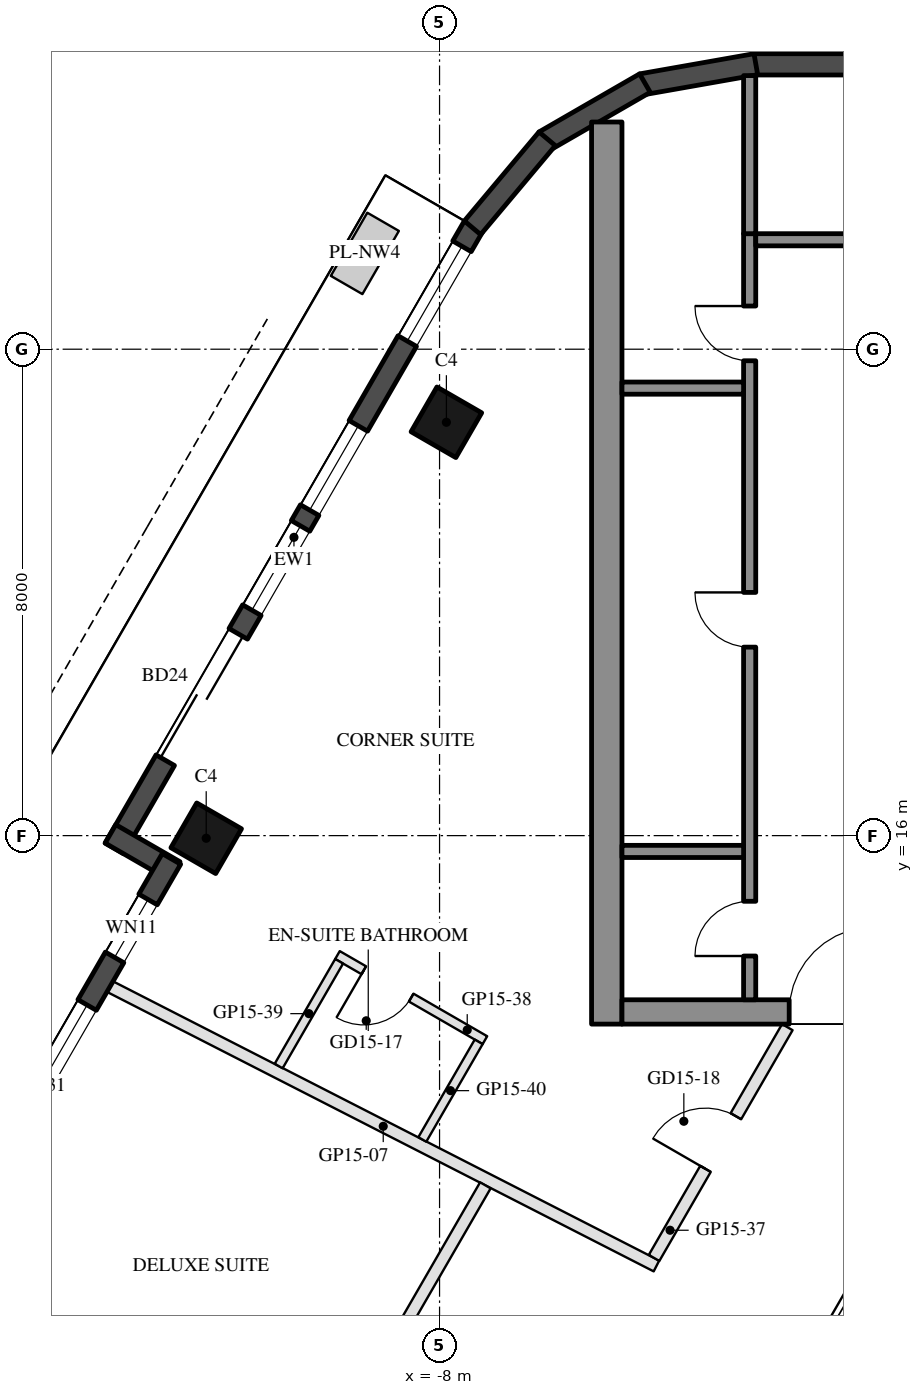
"""IFC4 building model, lengths in metres.
Left out: names, types, materials, properties, quantities, classifications, styles, units other than length and angle.
Written with IfcOpenShell. Run it as: python <this file> out.ifc"""

import sys

from ifc_helpers import new_model, si_unit, direction, frame, frame_2d, origin, origin_2d, place, context, subcontext, project, spatial, rectangle, hollow_rectangle, extrude, element, fill, save


model = new_model("IFC4")
c1 = context("Model", 3, precision=1e-05, world=origin(), true_north=direction((0.0, 1.0)))
c2 = subcontext(c1, "Body", "Model", "MODEL_VIEW")
j1 = project(units=[si_unit("LENGTHUNIT", "METRE"), si_unit("PLANEANGLEUNIT", "RADIAN")], contexts=[c1])
p1 = place(None, origin())
s1 = spatial("IfcSite", under=j1, at=p1, CompositionType="ELEMENT")
p2 = place(p1, origin())
s2 = spatial("IfcBuilding", under=s1, at=p2, CompositionType="ELEMENT")
p3 = place(p2, frame((0.0, 0.0, 168.8)))
s3 = spatial("IfcBuildingStorey", under=s2, at=p3, CompositionType="ELEMENT", Elevation=168.8)
for number, where, z_axis, x_axis in (
    (1, (-7.888, 22.798, 0.0), (0.0, 0.0, 1.0), (0.5, 0.866, 0.0)),
    (2, (-11.838, 15.957, 0.0), (0.0, 0.0, 1.0), (0.5, 0.866, 0.0)),
):
    element("IfcColumn", number, at=place(p3, frame(where, z_axis=z_axis, x_axis=x_axis)), inside=s3, PredefinedType="COLUMN", context=c2, shape_type="SweptSolid", body=[
        extrude(hollow_rectangle(XDim=0.85, YDim=0.85, WallThickness=0.04, at=origin_2d()), origin(), (0.0, 0.0, 1.0), 3.7),
    ])
p4 = place(p3, frame((-7.441, 26.022, 0.0), z_axis=(0.0, 0.0, 1.0), x_axis=(-0.499992533062, -0.86602971478, 0.0)))
e3 = element("IfcWall", 3, at=p4, inside=s3, PredefinedType="SOLIDWALL", context=c2, shape_type="SweptSolid", body=[
    extrude(rectangle(XDim=11.816, YDim=0.35, at=frame_2d((5.908, 0.0))), origin(), (0.0, 0.0, 1.0), 3.55),
])
p5 = place(p4, frame((0.381, 0.0, 0.3)))
e4 = element("IfcOpeningElement", 4, at=p5, cuts=e3, PredefinedType="OPENING", context=c2, shape_type="SweptSolid", body=[
    extrude(rectangle(XDim=1.8, YDim=2.65, at=frame_2d((0.9, 1.325))), frame((0.0, 0.185, 0.0), z_axis=(0.0, -1.0, 0.0), x_axis=(1.0, 0.0, 0.0)), (0.0, 0.0, 1.0), 0.37),
])
p6 = place(p4, frame((7.74, 0.0, 0.0)))
e5 = element("IfcOpeningElement", 5, at=p6, cuts=e3, PredefinedType="OPENING", context=c2, shape_type="SweptSolid", body=[
    extrude(rectangle(XDim=2.4, YDim=2.4, at=frame_2d((1.2, 1.2))), frame((0.0, 0.185, 0.0), z_axis=(0.0, -1.0, 0.0), x_axis=(1.0, 0.0, 0.0)), (0.0, 0.0, 1.0), 0.37),
])
p7 = place(p4, frame((3.791, 0.0, 0.3)))
e6 = element("IfcOpeningElement", 6, at=p7, cuts=e3, PredefinedType="OPENING", context=c2, shape_type="SweptSolid", body=[
    extrude(rectangle(XDim=1.6, YDim=2.65, at=frame_2d((0.8, 1.325))), frame((0.0, 0.185, 0.0), z_axis=(0.0, -1.0, 0.0), x_axis=(1.0, 0.0, 0.0)), (0.0, 0.0, 1.0), 0.37),
])
p8 = place(p4, frame((5.691, 0.0, 0.3)))
e7 = element("IfcOpeningElement", 7, at=p8, cuts=e3, PredefinedType="OPENING", context=c2, shape_type="SweptSolid", body=[
    extrude(rectangle(XDim=1.6, YDim=2.65, at=frame_2d((0.8, 1.325))), frame((0.0, 0.185, 0.0), z_axis=(0.0, -1.0, 0.0), x_axis=(1.0, 0.0, 0.0)), (0.0, 0.0, 1.0), 0.37),
])
p9 = place(p3, frame((-13.413, 16.029, 0.0), z_axis=(0.0, 0.0, 1.0), x_axis=(0.866005645448, -0.500034220881, 0.0)))
e8 = element("IfcWall", 8, at=p9, inside=s3, PredefinedType="SOLIDWALL", context=c2, shape_type="SweptSolid", body=[
    extrude(rectangle(XDim=1.22, YDim=0.35, at=frame_2d((0.61, 0.0))), origin(), (0.0, 0.0, 1.0), 3.55),
])
p10 = place(p3, frame((-12.409, 15.617, 0.0), z_axis=(0.0, 0.0, 1.0), x_axis=(-0.500003597184, -0.866023326939, 0.0)))
e9 = element("IfcWall", 9, at=p10, inside=s3, PredefinedType="SOLIDWALL", context=c2, shape_type="SweptSolid", body=[
    extrude(rectangle(XDim=6.74, YDim=0.35, at=frame_2d((3.37, 0.0))), origin(), (0.0, 0.0, 1.0), 3.55),
])
p11 = place(p10, frame((0.77, 0.0, 0.3)))
e10 = element("IfcOpeningElement", 10, at=p11, cuts=e9, PredefinedType="OPENING", context=c2, shape_type="SweptSolid", body=[
    extrude(rectangle(XDim=1.1, YDim=2.65, at=frame_2d((0.55, 1.325))), frame((0.0, 0.185, 0.0), z_axis=(0.0, -1.0, 0.0), x_axis=(1.0, 0.0, 0.0)), (0.0, 0.0, 1.0), 0.37),
])
p12 = place(p10, frame((2.774, 0.0, 0.3)))
e11 = element("IfcOpeningElement", 11, at=p12, cuts=e9, PredefinedType="OPENING", context=c2, shape_type="SweptSolid", body=[
    extrude(rectangle(XDim=3.1, YDim=2.65, at=frame_2d((1.55, 1.325))), frame((0.0, 0.185, 0.0), z_axis=(0.0, -1.0, 0.0), x_axis=(1.0, 0.0, 0.0)), (0.0, 0.0, 1.0), 0.37),
])
p13 = place(p3, frame((2.829, 28.685, 0.0), z_axis=(0.0, 0.0, 1.0), x_axis=(-1.0, 0.0, 0.0)))
e12 = element("IfcWall", 12, at=p13, inside=s3, PredefinedType="SOLIDWALL", context=c2, shape_type="SweptSolid", body=[
    extrude(rectangle(XDim=5.658, YDim=0.35, at=frame_2d((2.829, 0.0))), origin(), (0.0, 0.0, 1.0), 3.55),
])
for number, where, z_axis, x_axis in (
    (13, (-2.799, 28.688, 0.0), (0.0, 0.0, 1.0), (-0.985, -0.174, 0.0)),
    (14, (-4.623, 28.377, 0.0), (0.0, 0.0, 1.0), (-0.866, -0.5, 0.0)),
):
    element("IfcWall", number, at=place(p3, frame(where, z_axis=z_axis, x_axis=x_axis)), inside=s3, PredefinedType="SOLIDWALL", context=c2, shape_type="SweptSolid", body=[
        extrude(rectangle(XDim=1.91, YDim=0.35, at=frame_2d((0.955, 0.0))), origin(), (0.0, 0.0, 1.0), 3.55),
    ])
p14 = place(p3, frame((-6.23, 27.461, 0.0), z_axis=(0.0, 0.0, 1.0), x_axis=(-0.642808304945, -0.766027077259, 0.0)))
e15 = element("IfcWall", 15, at=p14, inside=s3, PredefinedType="SOLIDWALL", context=c2, shape_type="SweptSolid", body=[
    extrude(rectangle(XDim=1.91, YDim=0.35, at=frame_2d((0.955, 0.0))), origin(), (0.0, 0.0, 1.0), 3.55),
])
p15 = place(p3, frame((-5.25, 12.9, 0.0), z_axis=(0.0, 0.0, 1.0), x_axis=(0.0, 1.0, 0.0)))
e16 = element("IfcWall", 16, at=p15, inside=s3, PredefinedType="SHEAR", context=c2, shape_type="SweptSolid", body=[
    extrude(rectangle(XDim=14.837, YDim=0.5, at=frame_2d((7.418, 0.0))), origin(), (0.0, 0.0, 1.0), 3.5),
])
p16 = place(p3, frame((5.0, 13.1, 0.0), z_axis=(0.0, 0.0, 1.0), x_axis=(-1.0, 0.0, 0.0)))
e17 = element("IfcWall", 17, at=p16, inside=s3, PredefinedType="SHEAR", context=c2, shape_type="SweptSolid", body=[
    extrude(rectangle(XDim=10.0, YDim=0.4, at=frame_2d((5.0, 0.0))), origin(), (0.0, 0.0, 1.0), 3.5),
])
p17 = place(p16, frame((3.55, 0.0, 0.0)))
e18 = element("IfcOpeningElement", 18, at=p17, cuts=e17, PredefinedType="OPENING", context=c2, shape_type="SweptSolid", body=[
    extrude(rectangle(XDim=1.1, YDim=2.1, at=frame_2d((0.55, 1.05))), frame((0.0, 0.21, 0.0), z_axis=(0.0, -1.0, 0.0), x_axis=(1.0, 0.0, 0.0)), (0.0, 0.0, 1.0), 0.42),
])
p18 = place(p16, frame((5.85, 0.0, 0.0)))
e19 = element("IfcOpeningElement", 19, at=p18, cuts=e17, PredefinedType="OPENING", context=c2, shape_type="SweptSolid", body=[
    extrude(rectangle(XDim=1.4, YDim=2.1, at=frame_2d((0.7, 1.05))), frame((0.0, 0.21, 0.0), z_axis=(0.0, -1.0, 0.0), x_axis=(1.0, 0.0, 0.0)), (0.0, 0.0, 1.0), 0.42),
])
p19 = place(p3, frame((-2.9, 13.3, 0.0), z_axis=(0.0, 0.0, 1.0), x_axis=(0.0, 1.0, 0.0)))
e20 = element("IfcWall", 20, at=p19, inside=s3, PredefinedType="SHEAR", context=c2, shape_type="SweptSolid", body=[
    extrude(rectangle(XDim=12.6, YDim=0.2, at=frame_2d((6.3, 0.0))), origin(), (0.0, 0.0, 1.0), 3.5),
])
p20 = place(p19, frame((0.72, 0.0, 0.0)))
e21 = element("IfcOpeningElement", 21, at=p20, cuts=e20, PredefinedType="OPENING", context=c2, shape_type="SweptSolid", body=[
    extrude(rectangle(XDim=0.9, YDim=2.1, at=frame_2d((0.45, 1.05))), frame((0.0, 0.11, 0.0), z_axis=(0.0, -1.0, 0.0), x_axis=(1.0, 0.0, 0.0)), (0.0, 0.0, 1.0), 0.22),
])
p21 = place(p19, frame((5.8, 0.0, 0.0)))
e22 = element("IfcOpeningElement", 22, at=p21, cuts=e20, PredefinedType="OPENING", context=c2, shape_type="SweptSolid", body=[
    extrude(rectangle(XDim=0.9, YDim=2.1, at=frame_2d((0.45, 1.05))), frame((0.0, 0.11, 0.0), z_axis=(0.0, -1.0, 0.0), x_axis=(1.0, 0.0, 0.0)), (0.0, 0.0, 1.0), 0.22),
])
p22 = place(p19, frame((10.51, 0.0, 0.0)))
e23 = element("IfcOpeningElement", 23, at=p22, cuts=e20, PredefinedType="OPENING", context=c2, shape_type="SweptSolid", body=[
    extrude(rectangle(XDim=0.9, YDim=2.1, at=frame_2d((0.45, 1.05))), frame((0.0, 0.11, 0.0), z_axis=(0.0, -1.0, 0.0), x_axis=(1.0, 0.0, 0.0)), (0.0, 0.0, 1.0), 0.22),
])
p23 = place(p3, frame((-0.4, 25.8, 0.0), z_axis=(0.0, 0.0, 1.0), x_axis=(-1.0, 0.0, 0.0)))
e24 = element("IfcWall", 24, at=p23, inside=s3, PredefinedType="SHEAR", context=c2, shape_type="SweptSolid", body=[
    extrude(rectangle(XDim=2.4, YDim=0.2, at=frame_2d((1.2, 0.0))), origin(), (0.0, 0.0, 1.0), 3.5),
])
for number, where, z_axis, x_axis in (
    (25, (-3.0, 15.74, 0.0), (0.0, 0.0, 1.0), (-1.0, 0.0, 0.0)),
    (26, (-3.0, 23.36, 0.0), (0.0, 0.0, 1.0), (-1.0, 0.0, 0.0)),
):
    element("IfcWall", number, at=place(p3, frame(where, z_axis=z_axis, x_axis=x_axis)), inside=s3, PredefinedType="SHEAR", context=c2, shape_type="SweptSolid", body=[
        extrude(rectangle(XDim=2.0, YDim=0.2, at=frame_2d((1.0, 0.0))), origin(), (0.0, 0.0, 1.0), 3.5),
    ])
p24 = place(p3, frame((-2.9, 25.9, 0.0), z_axis=(0.0, 0.0, 1.0), x_axis=(0.0, 1.0, 0.0)))
e27 = element("IfcWall", 27, at=p24, inside=s3, PredefinedType="SHEAR", context=c2, shape_type="SweptSolid", body=[
    extrude(rectangle(XDim=2.6, YDim=0.2, at=frame_2d((1.3, 0.0))), origin(), (0.0, 0.0, 1.0), 3.5),
])
p25 = place(p3, frame((-13.42, 13.517, 0.0), z_axis=(0.0, 0.0, 1.0), x_axis=(0.890385665103, -0.455206950056, 0.0)))
e28 = element("IfcWall", 28, at=p25, inside=s3, PredefinedType="PARTITIONING", context=c2, shape_type="SweptSolid", body=[
    extrude(rectangle(XDim=10.093, YDim=0.2, at=frame_2d((5.047, 0.0))), origin(), (0.0, 0.0, 1.0), 3.06),
])
p26 = place(p3, frame((-4.472, 9.054, 0.0), z_axis=(0.0, 0.0, 1.0), x_axis=(0.499973180286, 0.8660408876, 0.0)))
e29 = element("IfcWall", 29, at=p26, inside=s3, PredefinedType="PARTITIONING", context=c2, shape_type="SweptSolid", body=[
    extrude(rectangle(XDim=4.383, YDim=0.2, at=frame_2d((2.191, 0.0))), origin(), (0.0, 0.0, 1.0), 2.95),
])
p27 = place(p26, frame((1.691, 0.0, 0.0)))
e30 = element("IfcOpeningElement", 30, at=p27, cuts=e29, PredefinedType="OPENING", context=c2, shape_type="SweptSolid", body=[
    extrude(rectangle(XDim=1.0, YDim=2.1, at=frame_2d((0.5, 1.05))), frame((0.0, 0.11, 0.0), z_axis=(0.0, -1.0, 0.0), x_axis=(1.0, 0.0, 0.0)), (0.0, 0.0, 1.0), 0.22),
])
p28 = place(p3, frame((-7.254, 12.636, 0.0), z_axis=(0.0, 0.0, 1.0), x_axis=(-0.865996816683, 0.500049511043, 0.0)))
e31 = element("IfcWall", 31, at=p28, inside=s3, PredefinedType="PARTITIONING", context=c2, shape_type="SweptSolid", body=[
    extrude(rectangle(XDim=2.8, YDim=0.15, at=frame_2d((1.4, 0.0))), origin(), (0.0, 0.0, 1.0), 3.55),
])
p29 = place(p28, frame((1.4, 0.0, 0.0)))
e32 = element("IfcOpeningElement", 32, at=p29, cuts=e31, PredefinedType="OPENING", context=c2, shape_type="SweptSolid", body=[
    extrude(rectangle(XDim=0.9, YDim=2.1, at=frame_2d((0.45, 1.05))), frame((0.0, 0.085, 0.0), z_axis=(0.0, -1.0, 0.0), x_axis=(1.0, 0.0, 0.0)), (0.0, 0.0, 1.0), 0.17),
])
p30 = place(p3, frame((-9.651, 13.933, 0.0), z_axis=(0.0, 0.0, 1.0), x_axis=(-0.50001992892, -0.866013897511, 0.0)))
e33 = element("IfcWall", 33, at=p30, inside=s3, PredefinedType="PARTITIONING", context=c2, shape_type="SweptSolid", body=[
    extrude(rectangle(XDim=1.989, YDim=0.15, at=frame_2d((0.995, 0.0))), origin(), (0.0, 0.0, 1.0), 3.55),
])
p31 = place(p3, frame((-7.356, 12.608, 0.0), z_axis=(0.0, 0.0, 1.0), x_axis=(-0.499935264145, -0.866062775822, 0.0)))
e34 = element("IfcWall", 34, at=p31, inside=s3, PredefinedType="PARTITIONING", context=c2, shape_type="SweptSolid", body=[
    extrude(rectangle(XDim=1.854, YDim=0.15, at=frame_2d((0.927, 0.0))), origin(), (0.0, 0.0, 1.0), 3.55),
])
p32 = place(p3, frame((-12.873, 0.504, 0.0), z_axis=(0.0, 0.0, 1.0), x_axis=(0.500019832059, 0.866013953437, 0.0)))
e35 = element("IfcWall", 35, at=p32, inside=s3, PredefinedType="PARTITIONING", context=c2, shape_type="SweptSolid", body=[
    extrude(rectangle(XDim=11.252, YDim=0.2, at=frame_2d((5.626, 0.0))), origin(), (0.0, 0.0, 1.0), 2.95),
])
p33 = place(p32, frame((2.45, 0.0, 0.0)))
e36 = element("IfcOpeningElement", 36, at=p33, cuts=e35, PredefinedType="OPENING", context=c2, shape_type="SweptSolid", body=[
    extrude(rectangle(XDim=1.0, YDim=2.1, at=frame_2d((0.5, 1.05))), frame((0.0, 0.11, 0.0), z_axis=(0.0, -1.0, 0.0), x_axis=(1.0, 0.0, 0.0)), (0.0, 0.0, 1.0), 0.22),
])
p34 = place(p5, origin())
e37 = element("IfcWindow", 37, at=p34, inside=s3, PartitioningType="SINGLE_PANEL", PredefinedType="WINDOW", context=c2, shape_type="SweptSolid", body=[
    extrude(rectangle(XDim=1.8, YDim=2.65, at=frame_2d((0.9, 1.325))), frame((0.0, 0.03, 0.0), z_axis=(0.0, -1.0, 0.0), x_axis=(1.0, 0.0, 0.0)), (0.0, 0.0, 1.0), 0.06),
])
fill(e4, e37)
p35 = place(p6, frame((2.4, 0.0, 0.0), z_axis=(0.0, 0.0, 1.0), x_axis=(-1.0, 0.0, 0.0)))
e38 = element("IfcDoor", 38, at=p35, inside=s3, OperationType="SLIDING_TO_LEFT", PredefinedType="DOOR", context=c2, shape_type="SweptSolid", body=[
    extrude(rectangle(XDim=2.4, YDim=2.4, at=frame_2d((1.2, 1.2))), frame((0.0, 0.025, 0.0), z_axis=(0.0, -1.0, 0.0), x_axis=(1.0, 0.0, 0.0)), (0.0, 0.0, 1.0), 0.05),
])
fill(e5, e38)
p36 = place(p7, origin())
e39 = element("IfcWindow", 39, at=p36, inside=s3, PartitioningType="SINGLE_PANEL", PredefinedType="WINDOW", context=c2, shape_type="SweptSolid", body=[
    extrude(rectangle(XDim=1.6, YDim=2.65, at=frame_2d((0.8, 1.325))), frame((0.0, 0.03, 0.0), z_axis=(0.0, -1.0, 0.0), x_axis=(1.0, 0.0, 0.0)), (0.0, 0.0, 1.0), 0.06),
])
fill(e6, e39)
p37 = place(p8, origin())
e40 = element("IfcWindow", 40, at=p37, inside=s3, PartitioningType="SINGLE_PANEL", PredefinedType="WINDOW", context=c2, shape_type="SweptSolid", body=[
    extrude(rectangle(XDim=1.6, YDim=2.65, at=frame_2d((0.8, 1.325))), frame((0.0, 0.03, 0.0), z_axis=(0.0, -1.0, 0.0), x_axis=(1.0, 0.0, 0.0)), (0.0, 0.0, 1.0), 0.06),
])
fill(e7, e40)
p38 = place(p11, origin())
e41 = element("IfcWindow", 41, at=p38, inside=s3, PartitioningType="SINGLE_PANEL", PredefinedType="WINDOW", context=c2, shape_type="SweptSolid", body=[
    extrude(rectangle(XDim=1.1, YDim=2.65, at=frame_2d((0.55, 1.325))), frame((0.0, 0.03, 0.0), z_axis=(0.0, -1.0, 0.0), x_axis=(1.0, 0.0, 0.0)), (0.0, 0.0, 1.0), 0.06),
])
fill(e10, e41)
p39 = place(p12, origin())
e42 = element("IfcWindow", 42, at=p39, inside=s3, PartitioningType="SINGLE_PANEL", PredefinedType="WINDOW", context=c2, shape_type="SweptSolid", body=[
    extrude(rectangle(XDim=3.1, YDim=2.65, at=frame_2d((1.55, 1.325))), frame((0.0, 0.03, 0.0), z_axis=(0.0, -1.0, 0.0), x_axis=(1.0, 0.0, 0.0)), (0.0, 0.0, 1.0), 0.06),
])
fill(e11, e42)
p40 = place(p20, origin())
e43 = element("IfcDoor", 43, at=p40, inside=s3, OperationType="SINGLE_SWING_LEFT", PredefinedType="DOOR", context=c2, shape_type="SweptSolid", body=[
    extrude(rectangle(XDim=0.9, YDim=2.1, at=frame_2d((0.45, 1.05))), frame((0.0, 0.025, 0.0), z_axis=(0.0, -1.0, 0.0), x_axis=(1.0, 0.0, 0.0)), (0.0, 0.0, 1.0), 0.05),
])
fill(e21, e43)
p41 = place(p21, origin())
e44 = element("IfcDoor", 44, at=p41, inside=s3, OperationType="SINGLE_SWING_RIGHT", PredefinedType="DOOR", context=c2, shape_type="SweptSolid", body=[
    extrude(rectangle(XDim=0.9, YDim=2.1, at=frame_2d((0.45, 1.05))), frame((0.0, 0.025, 0.0), z_axis=(0.0, -1.0, 0.0), x_axis=(1.0, 0.0, 0.0)), (0.0, 0.0, 1.0), 0.05),
])
fill(e22, e44)
p42 = place(p22, origin())
e45 = element("IfcDoor", 45, at=p42, inside=s3, OperationType="SINGLE_SWING_RIGHT", PredefinedType="DOOR", context=c2, shape_type="SweptSolid", body=[
    extrude(rectangle(XDim=0.9, YDim=2.1, at=frame_2d((0.45, 1.05))), frame((0.0, 0.025, 0.0), z_axis=(0.0, -1.0, 0.0), x_axis=(1.0, 0.0, 0.0)), (0.0, 0.0, 1.0), 0.05),
])
fill(e23, e45)
p43 = place(p18, frame((1.4, 0.0, 0.0), z_axis=(0.0, 0.0, 1.0), x_axis=(-1.0, 0.0, 0.0)))
e46 = element("IfcDoor", 46, at=p43, inside=s3, OperationType="DOUBLE_DOOR_SINGLE_SWING", PredefinedType="DOOR", context=c2, shape_type="SweptSolid", body=[
    extrude(rectangle(XDim=1.4, YDim=2.1, at=frame_2d((0.7, 1.05))), frame((0.0, 0.025, 0.0), z_axis=(0.0, -1.0, 0.0), x_axis=(1.0, 0.0, 0.0)), (0.0, 0.0, 1.0), 0.05),
])
fill(e19, e46)
p44 = place(p29, origin())
e47 = element("IfcDoor", 47, at=p44, inside=s3, OperationType="SINGLE_SWING_RIGHT", PredefinedType="DOOR", context=c2, shape_type="SweptSolid", body=[
    extrude(rectangle(XDim=0.9, YDim=2.1, at=frame_2d((0.45, 1.05))), frame((0.0, 0.025, 0.0), z_axis=(0.0, -1.0, 0.0), x_axis=(1.0, 0.0, 0.0)), (0.0, 0.0, 1.0), 0.05),
])
fill(e32, e47)
p45 = place(p27, origin())
e48 = element("IfcDoor", 48, at=p45, inside=s3, OperationType="SINGLE_SWING_LEFT", PredefinedType="DOOR", context=c2, shape_type="SweptSolid", body=[
    extrude(rectangle(XDim=1.0, YDim=2.1, at=frame_2d((0.5, 1.05))), frame((0.0, 0.025, 0.0), z_axis=(0.0, -1.0, 0.0), x_axis=(1.0, 0.0, 0.0)), (0.0, 0.0, 1.0), 0.05),
])
fill(e30, e48)
save(model, sys.argv[1])
